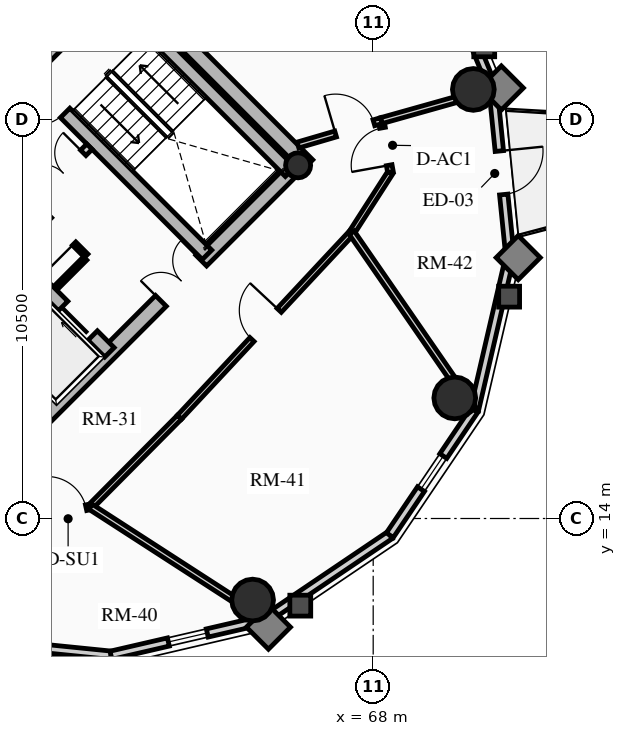
"""IFC4 building model, lengths in metres.
Left out: names, types, materials, properties, quantities, classifications, styles, units other than length and angle.
Written with IfcOpenShell. Run it as: python <this file> out.ifc"""

import sys

from ifc_helpers import new_model, si_unit, direction, frame, frame_2d, origin, origin_2d, place, context, subcontext, project, spatial, rectangle, circle, hollow_circle, extrude, source, transform, mapped, element, fill, save


model = new_model("IFC4")
c1 = context("Model", 3, precision=1e-05, world=origin(), true_north=direction((0.0, 1.0)))
c2 = subcontext(c1, "Body", "Model", "MODEL_VIEW")
j1 = project(units=[si_unit("LENGTHUNIT", "METRE"), si_unit("PLANEANGLEUNIT", "RADIAN")], contexts=[c1])
p1 = place(None, origin())
s1 = spatial("IfcSite", under=j1, at=p1, CompositionType="ELEMENT")
p2 = place(p1, origin())
s2 = spatial("IfcBuilding", under=s1, at=p2, CompositionType="ELEMENT")
p3 = place(p2, frame((0.0, 0.0, 208.3)))
s3 = spatial("IfcBuildingStorey", under=s2, at=p3, CompositionType="ELEMENT", Elevation=208.3)
p4 = place(p3, frame((66.268, 23.298, 0.0), z_axis=(0.0, 0.0, 1.0), x_axis=(-0.707106781187, 0.707106781187, 0.0)))
e1 = element("IfcWall", 1, at=p4, inside=s3, PredefinedType="SHEAR", context=c2, shape_type="SweptSolid", body=[
    extrude(rectangle(XDim=14.1, YDim=0.4, at=frame_2d((7.05, 0.0))), origin(), (0.0, 0.0, 1.0), 2.91),
])
p5 = place(p3, frame((58.561, 15.873, 0.0), z_axis=(0.0, 0.0, 1.0), x_axis=(0.707106781187, 0.707106781187, 0.0)))
e2 = element("IfcWall", 2, at=p5, inside=s3, PredefinedType="SHEAR", context=c2, shape_type="SweptSolid", body=[
    extrude(rectangle(XDim=10.7, YDim=0.4, at=frame_2d((5.35, 0.0))), origin(), (0.0, 0.0, 1.0), 2.91),
])
m1 = source(origin(), c2, "Body", "SweptSolid", [
    extrude(rectangle(XDim=1.5, YDim=2.02, at=frame_2d((0.75, 1.01))), frame((0.0, 0.21, 0.0), z_axis=(0.0, -1.0, 0.0), x_axis=(1.0, 0.0, 0.0)), (0.0, 0.0, 1.0), 0.42),
])
p6 = place(p5, frame((5.45, 0.0, 0.0)))
e3 = element("IfcOpeningElement", 3, at=p6, cuts=e2, PredefinedType="OPENING", context=c2, shape_type="MappedRepresentation", body=[
    mapped(m1, transform((0.0, 0.0, 0.0), x_axis=(1.0, 0.0, 0.0), y_axis=(0.0, 1.0, 0.0), z_axis=(0.0, 0.0, 1.0), scale=1.0)),
])
p7 = place(p3, frame((61.06, 18.373, 0.0), z_axis=(0.0, 0.0, 1.0), x_axis=(-0.707106781187, 0.707106781187, 0.0)))
e4 = element("IfcWall", 4, at=p7, inside=s3, PredefinedType="SHEAR", context=c2, shape_type="SweptSolid", body=[
    extrude(rectangle(XDim=13.7, YDim=0.35, at=frame_2d((6.85, 0.0))), origin(), (0.0, 0.0, 1.0), 2.91),
])
m2 = source(origin(), c2, "Body", "SweptSolid", [
    extrude(rectangle(XDim=1.1, YDim=2.015, at=frame_2d((0.55, 1.007))), frame((0.0, 0.185, 0.0), z_axis=(0.0, -1.0, 0.0), x_axis=(1.0, 0.0, 0.0)), (0.0, 0.0, 1.0), 0.37),
])
p8 = place(p7, frame((4.85, 0.0, 0.0)))
e5 = element("IfcOpeningElement", 5, at=p8, cuts=e4, PredefinedType="OPENING", context=c2, shape_type="MappedRepresentation", body=[
    mapped(m2, transform((0.0, 0.0, 0.0), x_axis=(1.0, 0.0, 0.0), y_axis=(0.0, 1.0, 0.0), z_axis=(0.0, 0.0, 1.0), scale=1.0)),
])
p9 = place(p7, frame((0.625, 0.0, 0.0)))
e6 = element("IfcOpeningElement", 6, at=p9, cuts=e4, PredefinedType="OPENING", context=c2, shape_type="MappedRepresentation", body=[
    mapped(m2, transform((0.0, 0.0, 0.0), x_axis=(1.0, 0.0, 0.0), y_axis=(0.0, 1.0, 0.0), z_axis=(0.0, 0.0, 1.0), scale=1.0)),
])
p10 = place(p7, frame((2.625, 0.0, 0.0)))
e7 = element("IfcOpeningElement", 7, at=p10, cuts=e4, PredefinedType="OPENING", context=c2, shape_type="MappedRepresentation", body=[
    mapped(m2, transform((0.0, 0.0, 0.0), x_axis=(1.0, 0.0, 0.0), y_axis=(0.0, 1.0, 0.0), z_axis=(0.0, 0.0, 1.0), scale=1.0)),
])
m3 = source(origin(), c2, "Body", "SweptSolid", [
    extrude(rectangle(XDim=1.15, YDim=2.02, at=frame_2d((0.575, 1.01))), frame((0.0, 0.185, 0.0), z_axis=(0.0, -1.0, 0.0), x_axis=(1.0, 0.0, 0.0)), (0.0, 0.0, 1.0), 0.37),
])
p11 = place(p7, frame((7.27, 0.0, 0.0)))
e8 = element("IfcOpeningElement", 8, at=p11, cuts=e4, PredefinedType="OPENING", context=c2, shape_type="MappedRepresentation", body=[
    mapped(m3, transform((0.0, 0.0, 0.0), x_axis=(1.0, 0.0, 0.0), y_axis=(0.0, 1.0, 0.0), z_axis=(0.0, 0.0, 1.0), scale=1.0)),
])
p12 = place(p3, frame((63.627, 20.94, 0.0), z_axis=(0.0, 0.0, 1.0), x_axis=(-0.707119496762, 0.707094065383, 0.0)))
e9 = element("IfcWall", 9, at=p12, inside=s3, PredefinedType="SHEAR", context=c2, shape_type="SweptSolid", body=[
    extrude(rectangle(XDim=9.6, YDim=0.35, at=frame_2d((4.8, 0.0))), origin(), (0.0, 0.0, 1.0), 2.91),
])
p13 = place(p12, frame((5.28, 0.0, 0.0)))
e10 = element("IfcOpeningElement", 10, at=p13, cuts=e9, PredefinedType="OPENING", context=c2, shape_type="MappedRepresentation", body=[
    mapped(m3, transform((0.0, 0.0, 0.0), x_axis=(1.0, 0.0, 0.0), y_axis=(0.0, 1.0, 0.0), z_axis=(0.0, 0.0, 1.0), scale=1.0)),
])
p14 = place(p3, frame((65.812, 23.125, 0.0), z_axis=(0.0, 0.0, 1.0), x_axis=(-0.707106781187, 0.707106781187, 0.0)))
e11 = element("IfcWall", 11, at=p14, inside=s3, PredefinedType="SHEAR", context=c2, shape_type="SweptSolid", body=[
    extrude(rectangle(XDim=6.695, YDim=0.35, at=frame_2d((3.348, 0.0))), origin(), (0.0, 0.0, 1.0), 2.91),
])
p15 = place(p3, frame((58.893, 25.674, 0.0), z_axis=(0.0, 0.0, 1.0), x_axis=(0.707106781187, 0.707106781187, 0.0)))
e12 = element("IfcWall", 12, at=p15, inside=s3, PredefinedType="SHEAR", context=c2, shape_type="SweptSolid", body=[
    extrude(rectangle(XDim=3.285, YDim=0.35, at=frame_2d((1.643, 0.0))), origin(), (0.0, 0.0, 1.0), 2.91),
])
p16 = place(p3, frame((66.024, 23.294, 0.0), z_axis=(0.0, 0.0, 1.0), x_axis=(0.707106781187, 0.707106781187, 0.0)))
e13 = element("IfcColumn", 13, at=p16, inside=s3, PredefinedType="COLUMN", context=c2, shape_type="SweptSolid", body=[
    extrude(hollow_circle(Radius=0.33, WallThickness=0.025, at=origin_2d()), origin(), (0.0, 0.0, 1.0), 2.91),
])
for number, where, z_axis, x_axis in (
    (14, (64.827, 11.854, 0.0), (0.0, 0.0, 1.0), (1.0, 0.0, 0.0)),
    (15, (70.146, 17.173, 0.0), (0.0, 0.0, 1.0), (1.0, 0.0, 0.0)),
    (16, (70.635, 25.291, 0.0), (0.0, 0.0, 1.0), (1.0, 0.0, 0.0)),
):
    element("IfcColumn", number, at=place(p3, frame(where, z_axis=z_axis, x_axis=x_axis)), inside=s3, PredefinedType="USERDEFINED", context=c2, shape_type="SweptSolid", body=[
        extrude(circle(Radius=0.55, at=origin_2d()), origin(), (0.0, 0.0, 1.0), 2.91),
    ])
p17 = place(p3, frame((61.1, 10.401, 0.0), z_axis=(0.0, 0.0, 1.0), x_axis=(-0.994929930991, 0.100570534541, 0.0)))
e17 = element("IfcWall", 17, at=p17, inside=s3, PredefinedType="SOLIDWALL", context=c2, shape_type="SweptSolid", body=[
    extrude(rectangle(XDim=4.418, YDim=0.22, at=frame_2d((2.209, 0.0))), origin(), (0.0, 0.0, 1.0), 2.322),
])
m4 = source(origin(), c2, "Body", "SweptSolid", [
    extrude(rectangle(XDim=1.05, YDim=1.3, at=frame_2d((0.525, 0.65))), frame((0.0, 0.12, 0.0), z_axis=(0.0, -1.0, 0.0), x_axis=(1.0, 0.0, 0.0)), (0.0, 0.0, 1.0), 0.24),
])
p18 = place(p17, frame((1.684, 0.0, 0.65)))
e18 = element("IfcOpeningElement", 18, at=p18, cuts=e17, PredefinedType="OPENING", context=c2, shape_type="MappedRepresentation", body=[
    mapped(m4, transform((0.0, 0.0, 0.0), x_axis=(1.0, 0.0, 0.0), y_axis=(0.0, 1.0, 0.0), z_axis=(0.0, 0.0, 1.0), scale=1.0)),
])
p19 = place(p3, frame((65.144, 11.337, 0.0), z_axis=(0.0, 0.0, 1.0), x_axis=(-0.974249228678, -0.225473813158, 0.0)))
e19 = element("IfcWall", 19, at=p19, inside=s3, PredefinedType="SOLIDWALL", context=c2, shape_type="SweptSolid", body=[
    extrude(rectangle(XDim=4.15, YDim=0.22, at=frame_2d((2.075, 0.0))), origin(), (0.0, 0.0, 1.0), 2.322),
])
p20 = place(p19, frame((1.55, 0.0, 0.65)))
e20 = element("IfcOpeningElement", 20, at=p20, cuts=e19, PredefinedType="OPENING", context=c2, shape_type="MappedRepresentation", body=[
    mapped(m4, transform((0.0, 0.0, 0.0), x_axis=(1.0, 0.0, 0.0), y_axis=(0.0, 1.0, 0.0), z_axis=(0.0, 0.0, 1.0), scale=1.0)),
])
p21 = place(p3, frame((68.439, 13.561, 0.0), z_axis=(0.0, 0.0, 1.0), x_axis=(-0.828833723692, -0.559495003079, 0.0)))
e21 = element("IfcWall", 21, at=p21, inside=s3, PredefinedType="SOLIDWALL", context=c2, shape_type="SweptSolid", body=[
    extrude(rectangle(XDim=3.976, YDim=0.22, at=frame_2d((1.988, 0.0))), origin(), (0.0, 0.0, 1.0), 2.322),
])
p22 = place(p3, frame((70.663, 16.856, 0.0), z_axis=(0.0, 0.0, 1.0), x_axis=(-0.559495003079, -0.828833723692, 0.0)))
e22 = element("IfcWall", 22, at=p22, inside=s3, PredefinedType="SOLIDWALL", context=c2, shape_type="SweptSolid", body=[
    extrude(rectangle(XDim=3.976, YDim=0.22, at=frame_2d((1.988, 0.0))), origin(), (0.0, 0.0, 1.0), 2.322),
])
p23 = place(p22, frame((1.463, 0.0, 0.65)))
e23 = element("IfcOpeningElement", 23, at=p23, cuts=e22, PredefinedType="OPENING", context=c2, shape_type="MappedRepresentation", body=[
    mapped(m4, transform((0.0, 0.0, 0.0), x_axis=(1.0, 0.0, 0.0), y_axis=(0.0, 1.0, 0.0), z_axis=(0.0, 0.0, 1.0), scale=1.0)),
])
p24 = place(p3, frame((71.599, 20.9, 0.0), z_axis=(0.0, 0.0, 1.0), x_axis=(-0.225473813158, -0.974249228678, 0.0)))
e24 = element("IfcWall", 24, at=p24, inside=s3, PredefinedType="SOLIDWALL", context=c2, shape_type="SweptSolid", body=[
    extrude(rectangle(XDim=4.15, YDim=0.22, at=frame_2d((2.075, 0.0))), origin(), (0.0, 0.0, 1.0), 2.322),
])
p25 = place(p3, frame((71.155, 25.295, 0.0), z_axis=(0.0, 0.0, 1.0), x_axis=(0.100570534541, -0.994929930991, 0.0)))
e25 = element("IfcWall", 25, at=p25, inside=s3, PredefinedType="SOLIDWALL", context=c2, shape_type="SweptSolid", body=[
    extrude(rectangle(XDim=4.418, YDim=0.22, at=frame_2d((2.209, 0.0))), origin(), (0.0, 0.0, 1.0), 2.322),
])
m5 = source(origin(), c2, "Body", "SweptSolid", [
    extrude(rectangle(XDim=1.15, YDim=2.005, at=frame_2d((0.575, 1.002))), frame((0.0, 0.12, 0.0), z_axis=(0.0, -1.0, 0.0), x_axis=(1.0, 0.0, 0.0)), (0.0, 0.0, 1.0), 0.24),
])
p26 = place(p25, frame((1.634, 0.0, 0.0)))
e26 = element("IfcOpeningElement", 26, at=p26, cuts=e25, PredefinedType="OPENING", context=c2, shape_type="MappedRepresentation", body=[
    mapped(m5, transform((0.0, 0.0, 0.0), x_axis=(1.0, 0.0, 0.0), y_axis=(0.0, 1.0, 0.0), z_axis=(0.0, 0.0, 1.0), scale=1.0)),
])
p27 = place(p3, frame((69.374, 29.613, 0.0), z_axis=(0.0, 0.0, 1.0), x_axis=(0.381309704956, -0.924447353237, 0.0)))
e27 = element("IfcWall", 27, at=p27, inside=s3, PredefinedType="SOLIDWALL", context=c2, shape_type="SweptSolid", body=[
    extrude(rectangle(XDim=4.671, YDim=0.22, at=frame_2d((2.335, 0.0))), origin(), (0.0, 0.0, 1.0), 2.322),
])
p28 = place(p3, frame((58.214, 21.467, 0.0), z_axis=(0.0, 0.0, 1.0), x_axis=(0.707106781187, 0.707106781187, 0.0)))
e28 = element("IfcWall", 28, at=p28, inside=s3, PredefinedType="PARTITIONING", context=c2, shape_type="SweptSolid", body=[
    extrude(rectangle(XDim=3.28, YDim=0.2, at=frame_2d((1.64, 0.0))), origin(), (0.0, 0.0, 1.0), 2.685),
])
m6 = source(origin(), c2, "Body", "SweptSolid", [
    extrude(rectangle(XDim=1.5, YDim=2.02, at=frame_2d((0.75, 1.01))), frame((0.0, 0.11, 0.0), z_axis=(0.0, -1.0, 0.0), x_axis=(1.0, 0.0, 0.0)), (0.0, 0.0, 1.0), 0.22),
])
p29 = place(p28, frame((1.55, 0.0, 0.0)))
e29 = element("IfcOpeningElement", 29, at=p29, cuts=e28, PredefinedType="OPENING", context=c2, shape_type="MappedRepresentation", body=[
    mapped(m6, transform((0.0, 0.0, 0.0), x_axis=(1.0, 0.0, 0.0), y_axis=(0.0, 1.0, 0.0), z_axis=(0.0, 0.0, 1.0), scale=1.0)),
])
p30 = place(p3, frame((60.448, 20.915, 0.0), z_axis=(0.0, 0.0, 1.0), x_axis=(-0.707106781187, 0.707106781187, 0.0)))
e30 = element("IfcWall", 30, at=p30, inside=s3, PredefinedType="PARTITIONING", context=c2, shape_type="SweptSolid", body=[
    extrude(rectangle(XDim=1.87, YDim=0.125, at=frame_2d((0.935, 0.0))), origin(), (0.0, 0.0, 1.0), 2.685),
])
m7 = source(origin(), c2, "Body", "SweptSolid", [
    extrude(rectangle(XDim=0.9, YDim=2.005, at=frame_2d((0.45, 1.002))), frame((0.0, 0.073, 0.0), z_axis=(0.0, -1.0, 0.0), x_axis=(1.0, 0.0, 0.0)), (0.0, 0.0, 1.0), 0.145),
])
p31 = place(p30, frame((0.45, 0.0, 0.0)))
e31 = element("IfcOpeningElement", 31, at=p31, cuts=e30, PredefinedType="OPENING", context=c2, shape_type="MappedRepresentation", body=[
    mapped(m7, transform((0.0, 0.0, 0.0), x_axis=(1.0, 0.0, 0.0), y_axis=(0.0, 1.0, 0.0), z_axis=(0.0, 0.0, 1.0), scale=1.0)),
])
p32 = place(p3, frame((59.643, 20.066, 0.0), z_axis=(0.0, 0.0, 1.0), x_axis=(0.707106781187, 0.707106781187, 0.0)))
e32 = element("IfcWall", 32, at=p32, inside=s3, PredefinedType="PARTITIONING", context=c2, shape_type="SweptSolid", body=[
    extrude(rectangle(XDim=1.1, YDim=0.125, at=frame_2d((0.55, 0.0))), origin(), (0.0, 0.0, 1.0), 2.685),
])
p33 = place(p3, frame((59.008, 13.963, 0.0), z_axis=(0.0, 0.0, 1.0), x_axis=(0.976020856791, 0.21767702476, 0.0)))
e33 = element("IfcWall", 33, at=p33, inside=s3, PredefinedType="PARTITIONING", context=c2, shape_type="SweptSolid", body=[
    extrude(rectangle(XDim=1.593, YDim=0.15, at=frame_2d((0.796, 0.0))), origin(), (0.0, 0.0, 1.0), 2.255),
])
m8 = source(origin(), c2, "Body", "SweptSolid", [
    extrude(rectangle(XDim=1.05, YDim=2.015, at=frame_2d((0.525, 1.007))), frame((0.0, 0.085, 0.0), z_axis=(0.0, -1.0, 0.0), x_axis=(1.0, 0.0, 0.0)), (0.0, 0.0, 1.0), 0.17),
])
p34 = place(p33, frame((0.423, 0.0, 0.0)))
e34 = element("IfcOpeningElement", 34, at=p34, cuts=e33, PredefinedType="OPENING", context=c2, shape_type="MappedRepresentation", body=[
    mapped(m8, transform((0.0, 0.0, 0.0), x_axis=(1.0, 0.0, 0.0), y_axis=(0.0, 1.0, 0.0), z_axis=(0.0, 0.0, 1.0), scale=1.0)),
])
p35 = place(p3, frame((60.562, 14.31, 0.0), z_axis=(0.0, 0.0, 1.0), x_axis=(0.704566236161, 0.709638230975, 0.0)))
e35 = element("IfcWall", 35, at=p35, inside=s3, PredefinedType="PARTITIONING", context=c2, shape_type="SweptSolid", body=[
    extrude(rectangle(XDim=3.321, YDim=0.15, at=frame_2d((1.661, 0.0))), origin(), (0.0, 0.0, 1.0), 2.322),
])
p36 = place(p3, frame((62.903, 16.667, 0.0), z_axis=(0.0, 0.0, 1.0), x_axis=(0.682371947497, 0.731005147225, 0.0)))
e36 = element("IfcWall", 36, at=p36, inside=s3, PredefinedType="PARTITIONING", context=c2, shape_type="SweptSolid", body=[
    extrude(rectangle(XDim=6.642, YDim=0.15, at=frame_2d((3.321, 0.0))), origin(), (0.0, 0.0, 1.0), 2.255),
])
p37 = place(p36, frame((2.796, 0.0, 0.0)))
e37 = element("IfcOpeningElement", 37, at=p37, cuts=e36, PredefinedType="OPENING", context=c2, shape_type="MappedRepresentation", body=[
    mapped(m8, transform((0.0, 0.0, 0.0), x_axis=(1.0, 0.0, 0.0), y_axis=(0.0, 1.0, 0.0), z_axis=(0.0, 0.0, 1.0), scale=1.0)),
])
p38 = place(p3, frame((67.435, 21.521, 0.0), z_axis=(0.0, 0.0, 1.0), x_axis=(0.540777197838, 0.841165870859, 0.0)))
e38 = element("IfcWall", 38, at=p38, inside=s3, PredefinedType="PARTITIONING", context=c2, shape_type="SweptSolid", body=[
    extrude(rectangle(XDim=1.888, YDim=0.15, at=frame_2d((0.944, 0.0))), origin(), (0.0, 0.0, 1.0), 2.255),
])
p39 = place(p3, frame((68.456, 23.11, 0.0), z_axis=(0.0, 0.0, 1.0), x_axis=(-0.1772522795, 0.984165448191, 0.0)))
e39 = element("IfcWall", 39, at=p39, inside=s3, PredefinedType="PARTITIONING", context=c2, shape_type="SweptSolid", body=[
    extrude(rectangle(XDim=1.382, YDim=0.15, at=frame_2d((0.691, 0.0))), origin(), (0.0, 0.0, 1.0), 2.322),
])
m9 = source(origin(), c2, "Body", "SweptSolid", [
    extrude(rectangle(XDim=1.0, YDim=2.015, at=frame_2d((0.5, 1.007))), frame((0.0, 0.085, 0.0), z_axis=(0.0, -1.0, 0.0), x_axis=(1.0, 0.0, 0.0)), (0.0, 0.0, 1.0), 0.17),
])
p40 = place(p39, frame((0.191, 0.0, 0.0)))
e40 = element("IfcOpeningElement", 40, at=p40, cuts=e39, PredefinedType="OPENING", context=c2, shape_type="MappedRepresentation", body=[
    mapped(m9, transform((0.0, 0.0, 0.0), x_axis=(1.0, 0.0, 0.0), y_axis=(0.0, 1.0, 0.0), z_axis=(0.0, 0.0, 1.0), scale=1.0)),
])
p41 = place(p3, frame((60.562, 14.31, 0.0), z_axis=(0.0, 0.0, 1.0), x_axis=(0.839858797161, -0.542804938105, 0.0)))
e41 = element("IfcWall", 41, at=p41, inside=s3, PredefinedType="PARTITIONING", context=c2, shape_type="SweptSolid", body=[
    extrude(rectangle(XDim=5.444, YDim=0.16, at=frame_2d((2.722, 0.0))), origin(), (0.0, 0.0, 1.0), 2.322),
])
p42 = place(p3, frame((67.435, 21.521, 0.0), z_axis=(0.0, 0.0, 1.0), x_axis=(0.567700677576, -0.823235045828, 0.0)))
e42 = element("IfcWall", 42, at=p42, inside=s3, PredefinedType="PARTITIONING", context=c2, shape_type="SweptSolid", body=[
    extrude(rectangle(XDim=5.656, YDim=0.16, at=frame_2d((2.828, 0.0))), origin(), (0.0, 0.0, 1.0), 2.322),
])
p43 = place(p3, frame((68.211, 24.469, 0.0), z_axis=(0.0, 0.0, 1.0), x_axis=(0.962605107736, 0.270908483735, 0.0)))
e43 = element("IfcWall", 43, at=p43, inside=s3, PredefinedType="PARTITIONING", context=c2, shape_type="SweptSolid", body=[
    extrude(rectangle(XDim=3.038, YDim=0.16, at=frame_2d((1.519, 0.0))), origin(), (0.0, 0.0, 1.0), 2.322),
])
p44 = place(p3, frame((66.021, 23.828, 0.0), z_axis=(0.0, 0.0, 1.0), x_axis=(0.959727558294, 0.280932400856, 0.0)))
e44 = element("IfcWall", 44, at=p44, inside=s3, PredefinedType="PARTITIONING", context=c2, shape_type="SweptSolid", body=[
    extrude(rectangle(XDim=2.282, YDim=0.16, at=frame_2d((1.141, 0.0))), origin(), (0.0, 0.0, 1.0), 2.255),
])
m10 = source(origin(), c2, "Body", "SweptSolid", [
    extrude(rectangle(XDim=1.05, YDim=2.015, at=frame_2d((0.525, 1.007))), frame((0.0, 0.09, 0.0), z_axis=(0.0, -1.0, 0.0), x_axis=(1.0, 0.0, 0.0)), (0.0, 0.0, 1.0), 0.18),
])
p45 = place(p44, frame((1.032, 0.0, 0.0)))
e45 = element("IfcOpeningElement", 45, at=p45, cuts=e44, PredefinedType="OPENING", context=c2, shape_type="MappedRepresentation", body=[
    mapped(m10, transform((0.0, 0.0, 0.0), x_axis=(1.0, 0.0, 0.0), y_axis=(0.0, 1.0, 0.0), z_axis=(0.0, 0.0, 1.0), scale=1.0)),
])
m11 = source(origin(), c2, "Body", "SweptSolid", [
    extrude(rectangle(XDim=1.05, YDim=1.3, at=frame_2d((0.525, 0.65))), frame((0.0, 0.03, 0.0), z_axis=(0.0, -1.0, 0.0), x_axis=(1.0, 0.0, 0.0)), (0.0, 0.0, 1.0), 0.06),
])
p46 = place(p20, origin())
e46 = element("IfcWindow", 46, at=p46, inside=s3, PartitioningType="SINGLE_PANEL", PredefinedType="WINDOW", context=c2, shape_type="MappedRepresentation", body=[
    mapped(m11, transform((0.0, 0.0, 0.0), x_axis=(1.0, 0.0, 0.0), y_axis=(0.0, 1.0, 0.0), z_axis=(0.0, 0.0, 1.0), scale=1.0)),
])
fill(e20, e46)
p47 = place(p23, origin())
e47 = element("IfcWindow", 47, at=p47, inside=s3, PartitioningType="SINGLE_PANEL", PredefinedType="WINDOW", context=c2, shape_type="MappedRepresentation", body=[
    mapped(m11, transform((0.0, 0.0, 0.0), x_axis=(1.0, 0.0, 0.0), y_axis=(0.0, 1.0, 0.0), z_axis=(0.0, 0.0, 1.0), scale=1.0)),
])
fill(e23, e47)
m12 = source(origin(), c2, "Body", "SweptSolid", [
    extrude(rectangle(XDim=1.15, YDim=2.005, at=frame_2d((0.575, 1.002))), frame((0.0, 0.025, 0.0), z_axis=(0.0, -1.0, 0.0), x_axis=(1.0, 0.0, 0.0)), (0.0, 0.0, 1.0), 0.05),
])
p48 = place(p26, origin())
e48 = element("IfcDoor", 48, at=p48, inside=s3, OperationType="SINGLE_SWING_LEFT", PredefinedType="DOOR", context=c2, shape_type="MappedRepresentation", body=[
    mapped(m12, transform((0.0, 0.0, 0.0), x_axis=(1.0, 0.0, 0.0), y_axis=(0.0, 1.0, 0.0), z_axis=(0.0, 0.0, 1.0), scale=1.0)),
])
fill(e26, e48)
m13 = source(origin(), c2, "Body", "SweptSolid", [
    extrude(rectangle(XDim=1.1, YDim=2.015, at=frame_2d((0.55, 1.007))), frame((0.0, 0.025, 0.0), z_axis=(0.0, -1.0, 0.0), x_axis=(1.0, 0.0, 0.0)), (0.0, 0.0, 1.0), 0.05),
])
p49 = place(p9, origin())
e49 = element("IfcDoor", 49, at=p49, inside=s3, OperationType="SLIDING_TO_RIGHT", PredefinedType="DOOR", context=c2, shape_type="MappedRepresentation", body=[
    mapped(m13, transform((0.0, 0.0, 0.0), x_axis=(1.0, 0.0, 0.0), y_axis=(0.0, 1.0, 0.0), z_axis=(0.0, 0.0, 1.0), scale=1.0)),
])
fill(e6, e49)
m14 = source(origin(), c2, "Body", "SweptSolid", [
    extrude(rectangle(XDim=1.15, YDim=2.02, at=frame_2d((0.575, 1.01))), frame((0.0, 0.025, 0.0), z_axis=(0.0, -1.0, 0.0), x_axis=(1.0, 0.0, 0.0)), (0.0, 0.0, 1.0), 0.05),
])
p50 = place(p13, origin())
e50 = element("IfcDoor", 50, at=p50, inside=s3, OperationType="SINGLE_SWING_RIGHT", PredefinedType="DOOR", context=c2, shape_type="MappedRepresentation", body=[
    mapped(m14, transform((0.0, 0.0, 0.0), x_axis=(1.0, 0.0, 0.0), y_axis=(0.0, 1.0, 0.0), z_axis=(0.0, 0.0, 1.0), scale=1.0)),
])
fill(e10, e50)
m15 = source(origin(), c2, "Body", "SweptSolid", [
    extrude(rectangle(XDim=1.5, YDim=2.02, at=frame_2d((0.75, 1.01))), frame((0.0, 0.025, 0.0), z_axis=(0.0, -1.0, 0.0), x_axis=(1.0, 0.0, 0.0)), (0.0, 0.0, 1.0), 0.05),
])
p51 = place(p6, origin())
e51 = element("IfcDoor", 51, at=p51, inside=s3, OperationType="DOUBLE_DOOR_SINGLE_SWING", PredefinedType="DOOR", context=c2, shape_type="MappedRepresentation", body=[
    mapped(m15, transform((0.0, 0.0, 0.0), x_axis=(1.0, 0.0, 0.0), y_axis=(0.0, 1.0, 0.0), z_axis=(0.0, 0.0, 1.0), scale=1.0)),
])
fill(e3, e51)
p52 = place(p29, origin())
e52 = element("IfcDoor", 52, at=p52, inside=s3, OperationType="DOUBLE_DOOR_SINGLE_SWING", PredefinedType="DOOR", context=c2, shape_type="MappedRepresentation", body=[
    mapped(m15, transform((0.0, 0.0, 0.0), x_axis=(1.0, 0.0, 0.0), y_axis=(0.0, 1.0, 0.0), z_axis=(0.0, 0.0, 1.0), scale=1.0)),
])
fill(e29, e52)
m16 = source(origin(), c2, "Body", "SweptSolid", [
    extrude(rectangle(XDim=0.9, YDim=2.005, at=frame_2d((0.45, 1.002))), frame((0.0, 0.025, 0.0), z_axis=(0.0, -1.0, 0.0), x_axis=(1.0, 0.0, 0.0)), (0.0, 0.0, 1.0), 0.05),
])
p53 = place(p31, origin())
e53 = element("IfcDoor", 53, at=p53, inside=s3, OperationType="SINGLE_SWING_LEFT", PredefinedType="DOOR", context=c2, shape_type="MappedRepresentation", body=[
    mapped(m16, transform((0.0, 0.0, 0.0), x_axis=(1.0, 0.0, 0.0), y_axis=(0.0, 1.0, 0.0), z_axis=(0.0, 0.0, 1.0), scale=1.0)),
])
fill(e31, e53)
m17 = source(origin(), c2, "Body", "SweptSolid", [
    extrude(rectangle(XDim=1.05, YDim=2.015, at=frame_2d((0.525, 1.007))), frame((0.0, 0.025, 0.0), z_axis=(0.0, -1.0, 0.0), x_axis=(1.0, 0.0, 0.0)), (0.0, 0.0, 1.0), 0.05),
])
p54 = place(p45, origin())
e54 = element("IfcDoor", 54, at=p54, inside=s3, OperationType="SINGLE_SWING_LEFT", PredefinedType="DOOR", context=c2, shape_type="MappedRepresentation", body=[
    mapped(m17, transform((0.0, 0.0, 0.0), x_axis=(1.0, 0.0, 0.0), y_axis=(0.0, 1.0, 0.0), z_axis=(0.0, 0.0, 1.0), scale=1.0)),
])
fill(e45, e54)
p55 = place(p34, origin())
e55 = element("IfcDoor", 55, at=p55, inside=s3, OperationType="SINGLE_SWING_LEFT", PredefinedType="DOOR", context=c2, shape_type="MappedRepresentation", body=[
    mapped(m17, transform((0.0, 0.0, 0.0), x_axis=(1.0, 0.0, 0.0), y_axis=(0.0, 1.0, 0.0), z_axis=(0.0, 0.0, 1.0), scale=1.0)),
])
fill(e34, e55)
p56 = place(p37, origin())
e56 = element("IfcDoor", 56, at=p56, inside=s3, OperationType="SINGLE_SWING_RIGHT", PredefinedType="DOOR", context=c2, shape_type="MappedRepresentation", body=[
    mapped(m17, transform((0.0, 0.0, 0.0), x_axis=(1.0, 0.0, 0.0), y_axis=(0.0, 1.0, 0.0), z_axis=(0.0, 0.0, 1.0), scale=1.0)),
])
fill(e37, e56)
m18 = source(origin(), c2, "Body", "SweptSolid", [
    extrude(rectangle(XDim=1.0, YDim=2.015, at=frame_2d((0.5, 1.007))), frame((0.0, 0.025, 0.0), z_axis=(0.0, -1.0, 0.0), x_axis=(1.0, 0.0, 0.0)), (0.0, 0.0, 1.0), 0.05),
])
p57 = place(p40, origin())
e57 = element("IfcDoor", 57, at=p57, inside=s3, OperationType="SINGLE_SWING_LEFT", PredefinedType="DOOR", context=c2, shape_type="MappedRepresentation", body=[
    mapped(m18, transform((0.0, 0.0, 0.0), x_axis=(1.0, 0.0, 0.0), y_axis=(0.0, 1.0, 0.0), z_axis=(0.0, 0.0, 1.0), scale=1.0)),
])
fill(e40, e57)
save(model, sys.argv[1])
